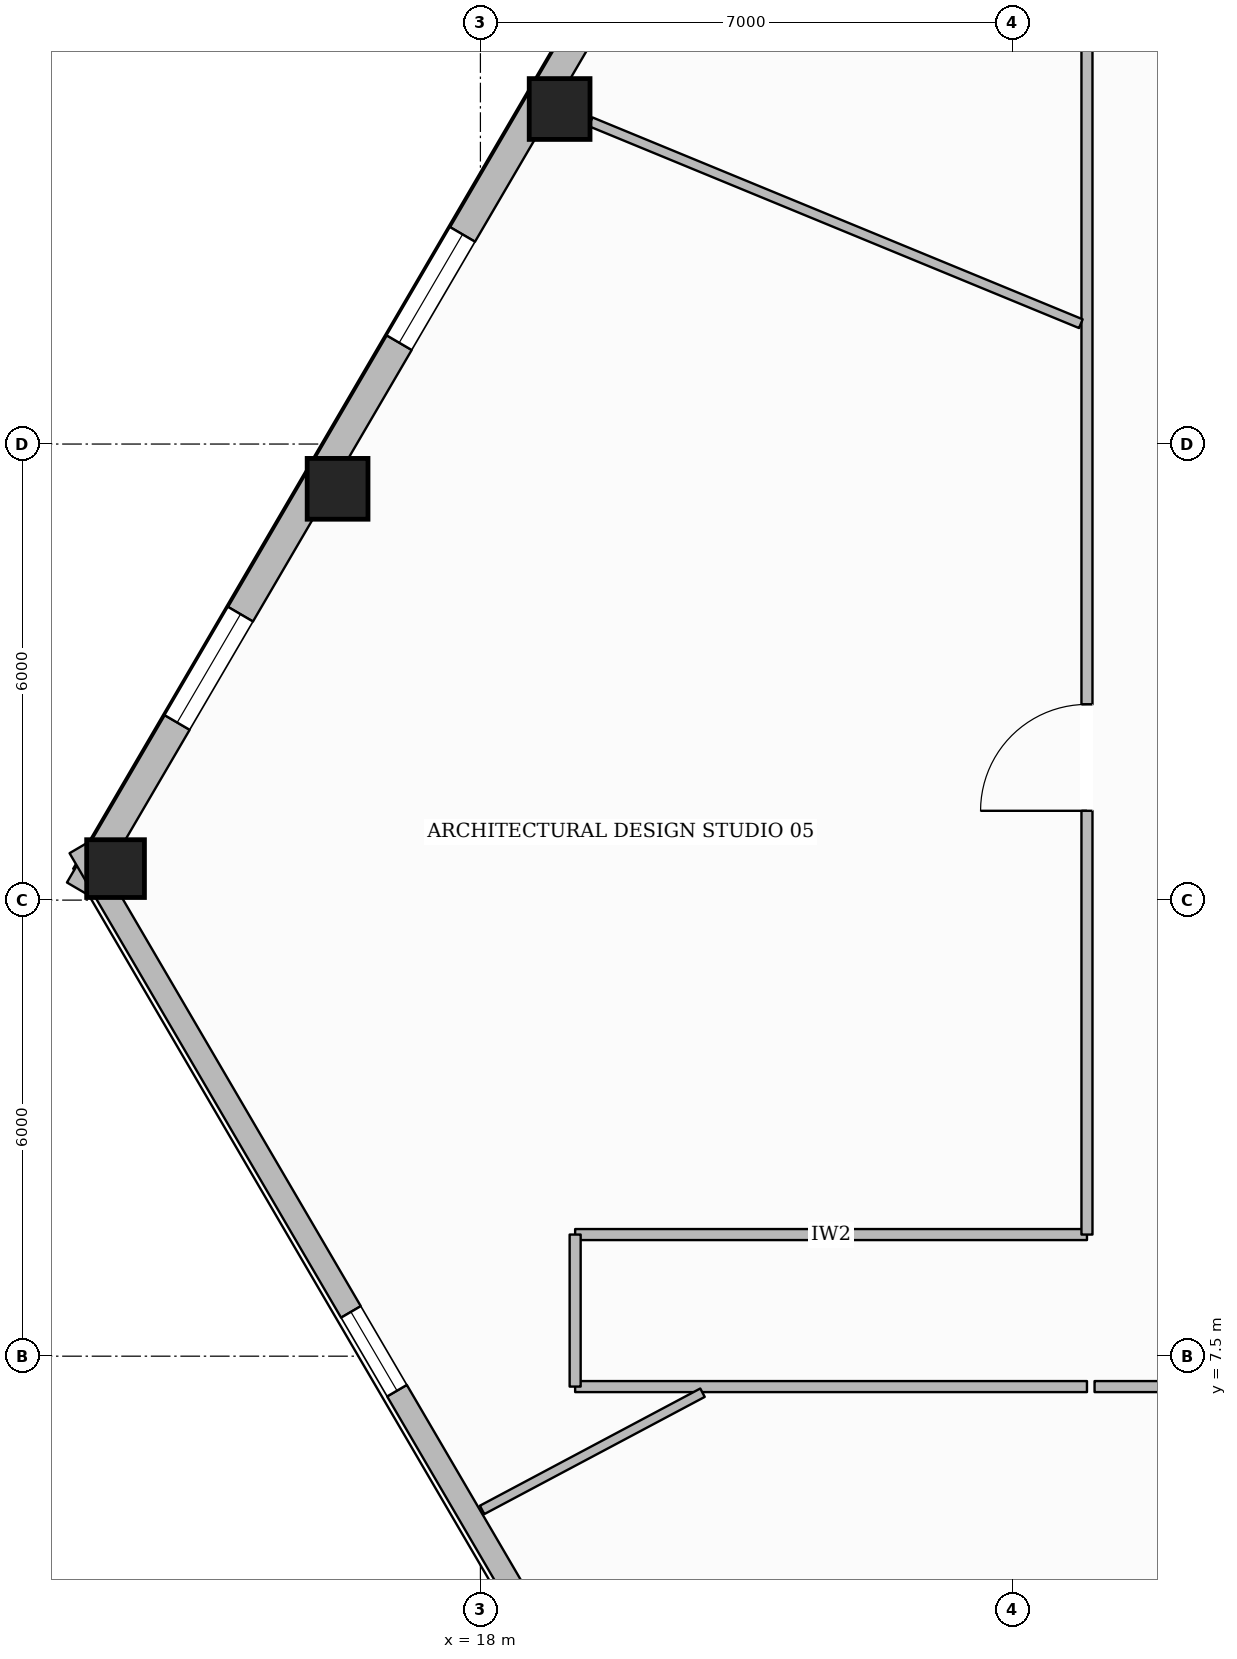
"""IFC4 building model, lengths in metres.
Left out: names, types, materials, properties, quantities, classifications, styles, units other than length and angle.
Written with IfcOpenShell. Run it as: python <this file> out.ifc"""

import sys

from ifc_helpers import new_model, si_unit, direction, frame, frame_2d, origin, origin_2d, place, context, subcontext, project, spatial, rectangle, hollow_rectangle, extrude, element, fill, save


model = new_model("IFC4")
c1 = context("Model", 3, precision=1e-05, world=origin(), true_north=direction((0.0, 1.0)))
c2 = subcontext(c1, "Body", "Model", "MODEL_VIEW")
j1 = project(units=[si_unit("LENGTHUNIT", "METRE"), si_unit("PLANEANGLEUNIT", "RADIAN")], contexts=[c1])
p1 = place(None, origin())
s1 = spatial("IfcSite", under=j1, at=p1, CompositionType="ELEMENT")
p2 = place(p1, origin())
s2 = spatial("IfcBuilding", under=s1, at=p2, CompositionType="ELEMENT")
p3 = place(p2, frame((0.0, 0.0, 59.9)))
s3 = spatial("IfcBuildingStorey", under=s2, at=p3, CompositionType="ELEMENT", Elevation=59.9)
for number, where, z_axis, x_axis in (
    (1, (19.042, 23.908, 0.0), (0.0, 0.0, 1.0), (1.0, 0.0, 0.0)),
    (2, (16.121, 18.911, 0.0), (0.0, 0.0, 1.0), (1.0, 0.0, 0.0)),
):
    element("IfcColumn", number, at=place(p3, frame(where, z_axis=z_axis, x_axis=x_axis)), inside=s3, PredefinedType="COLUMN", context=c2, shape_type="SweptSolid", body=[
        extrude(hollow_rectangle(XDim=0.8, YDim=0.8, WallThickness=0.036, at=origin_2d()), origin(), (0.0, 0.0, 1.0), 3.59),
    ])
p4 = place(p3, frame((13.2, 13.915, 0.0), z_axis=(0.0, 0.0, 1.0), x_axis=(1.0, 0.0, 0.0)))
e3 = element("IfcColumn", 3, at=p4, inside=s3, PredefinedType="COLUMN", context=c2, shape_type="SweptSolid", body=[
    extrude(hollow_rectangle(XDim=0.76, YDim=0.76, WallThickness=0.035, at=origin_2d()), origin(), (0.0, 0.0, 1.0), 3.59),
])
p5 = place(p3, frame((12.724, 13.636, 0.0), z_axis=(0.0, 0.0, 1.0), x_axis=(0.504702471056, 0.863293354376, 0.0)))
e4 = element("IfcWall", 4, at=p5, inside=s3, PredefinedType="STANDARD", context=c2, shape_type="SweptSolid", body=[
    extrude(rectangle(XDim=35.682, YDim=0.38, at=frame_2d((17.841, 0.0))), origin(), (0.0, 0.0, 1.0), 2.97),
])
p6 = place(p5, frame((31.488, 0.0, 0.65)))
e5 = element("IfcOpeningElement", 5, at=p6, cuts=e4, PredefinedType="OPENING", context=c2, shape_type="SweptSolid", body=[
    extrude(rectangle(XDim=1.65, YDim=1.75, at=frame_2d((0.825, 0.875))), frame((0.0, 0.2, 0.0), z_axis=(0.0, -1.0, 0.0), x_axis=(1.0, 0.0, 0.0)), (0.0, 0.0, 1.0), 0.4),
])
p7 = place(p5, frame((25.701, 0.0, 0.65)))
e6 = element("IfcOpeningElement", 6, at=p7, cuts=e4, PredefinedType="OPENING", context=c2, shape_type="SweptSolid", body=[
    extrude(rectangle(XDim=1.65, YDim=1.75, at=frame_2d((0.825, 0.875))), frame((0.0, 0.2, 0.0), z_axis=(0.0, -1.0, 0.0), x_axis=(1.0, 0.0, 0.0)), (0.0, 0.0, 1.0), 0.4),
])
p8 = place(p5, frame((14.125, 0.0, 0.65)))
e7 = element("IfcOpeningElement", 7, at=p8, cuts=e4, PredefinedType="OPENING", context=c2, shape_type="SweptSolid", body=[
    extrude(rectangle(XDim=1.65, YDim=1.75, at=frame_2d((0.825, 0.875))), frame((0.0, 0.2, 0.0), z_axis=(0.0, -1.0, 0.0), x_axis=(1.0, 0.0, 0.0)), (0.0, 0.0, 1.0), 0.4),
])
p9 = place(p5, frame((8.337, 0.0, 0.65)))
e8 = element("IfcOpeningElement", 8, at=p9, cuts=e4, PredefinedType="OPENING", context=c2, shape_type="SweptSolid", body=[
    extrude(rectangle(XDim=1.65, YDim=1.75, at=frame_2d((0.825, 0.875))), frame((0.0, 0.2, 0.0), z_axis=(0.0, -1.0, 0.0), x_axis=(1.0, 0.0, 0.0)), (0.0, 0.0, 1.0), 0.4),
])
p10 = place(p5, frame((2.549, 0.0, 0.65)))
e9 = element("IfcOpeningElement", 9, at=p10, cuts=e4, PredefinedType="OPENING", context=c2, shape_type="SweptSolid", body=[
    extrude(rectangle(XDim=1.65, YDim=1.75, at=frame_2d((0.825, 0.875))), frame((0.0, 0.2, 0.0), z_axis=(0.0, -1.0, 0.0), x_axis=(1.0, 0.0, 0.0)), (0.0, 0.0, 1.0), 0.4),
])
p11 = place(p3, frame((20.475, 0.936, 0.0), z_axis=(0.0, 0.0, 1.0), x_axis=(-0.504699139316, 0.863295302184, 0.0)))
e10 = element("IfcWall", 10, at=p11, inside=s3, PredefinedType="STANDARD", context=c2, shape_type="SweptSolid", body=[
    extrude(rectangle(XDim=15.357, YDim=0.3, at=frame_2d((7.678, 0.0))), origin(), (0.0, 0.0, 1.0), 2.97),
])
p12 = place(p11, frame((7.078, 0.0, 0.65)))
e11 = element("IfcOpeningElement", 11, at=p12, cuts=e10, PredefinedType="OPENING", context=c2, shape_type="SweptSolid", body=[
    extrude(rectangle(XDim=1.2, YDim=1.7, at=frame_2d((0.6, 0.85))), frame((0.0, 0.16, 0.0), z_axis=(0.0, -1.0, 0.0), x_axis=(1.0, 0.0, 0.0)), (0.0, 0.0, 1.0), 0.32),
])
p13 = place(p3, frame((19.246, 9.1, 0.0), z_axis=(0.0, 0.0, 1.0), x_axis=(1.0, 0.0, 0.0)))
e12 = element("IfcWall", 12, at=p13, inside=s3, PredefinedType="PARTITIONING", context=c2, shape_type="SweptSolid", body=[
    extrude(rectangle(XDim=6.734, YDim=0.145, at=frame_2d((3.367, 0.0))), origin(), (0.0, 0.0, 1.0), 3.59),
])
p14 = place(p3, frame((25.98, 9.1, 0.0), z_axis=(0.0, 0.0, 1.0), x_axis=(0.0, 1.0, 0.0)))
e13 = element("IfcWall", 13, at=p14, inside=s3, PredefinedType="PARTITIONING", context=c2, shape_type="SweptSolid", body=[
    extrude(rectangle(XDim=16.0, YDim=0.145, at=frame_2d((8.0, 0.0))), origin(), (0.0, 0.0, 1.0), 3.278),
])
p15 = place(p14, frame((5.575, 0.0, 0.0)))
e14 = element("IfcOpeningElement", 14, at=p15, cuts=e13, PredefinedType="OPENING", context=c2, shape_type="SweptSolid", body=[
    extrude(rectangle(XDim=1.4, YDim=2.2, at=frame_2d((0.7, 1.1))), frame((0.0, 0.083, 0.0), z_axis=(0.0, -1.0, 0.0), x_axis=(1.0, 0.0, 0.0)), (0.0, 0.0, 1.0), 0.165),
])
p16 = place(p3, frame((49.92, 7.1, 0.0), z_axis=(0.0, 0.0, 1.0), x_axis=(-1.0, 0.0, 0.0)))
e15 = element("IfcWall", 15, at=p16, inside=s3, PredefinedType="PARTITIONING", context=c2, shape_type="SweptSolid", body=[
    extrude(rectangle(XDim=23.84, YDim=0.145, at=frame_2d((11.92, 0.0))), origin(), (0.0, 0.0, 1.0), 3.278),
])
p17 = place(p16, frame((18.48, 0.0, 0.0)))
e16 = element("IfcOpeningElement", 16, at=p17, cuts=e15, PredefinedType="OPENING", context=c2, shape_type="SweptSolid", body=[
    extrude(rectangle(XDim=0.88, YDim=2.1, at=frame_2d((0.44, 1.05))), frame((0.0, 0.083, 0.0), z_axis=(0.0, -1.0, 0.0), x_axis=(1.0, 0.0, 0.0)), (0.0, 0.0, 1.0), 0.165),
])
p18 = place(p16, frame((15.96, 0.0, 0.0)))
e17 = element("IfcOpeningElement", 17, at=p18, cuts=e15, PredefinedType="OPENING", context=c2, shape_type="SweptSolid", body=[
    extrude(rectangle(XDim=0.88, YDim=2.1, at=frame_2d((0.44, 1.05))), frame((0.0, 0.083, 0.0), z_axis=(0.0, -1.0, 0.0), x_axis=(1.0, 0.0, 0.0)), (0.0, 0.0, 1.0), 0.165),
])
p19 = place(p16, frame((13.5, 0.0, 0.0)))
e18 = element("IfcOpeningElement", 18, at=p19, cuts=e15, PredefinedType="OPENING", context=c2, shape_type="SweptSolid", body=[
    extrude(rectangle(XDim=0.96, YDim=2.1, at=frame_2d((0.48, 1.05))), frame((0.0, 0.083, 0.0), z_axis=(0.0, -1.0, 0.0), x_axis=(1.0, 0.0, 0.0)), (0.0, 0.0, 1.0), 0.165),
])
p20 = place(p16, frame((5.801, 0.0, 0.0)))
e19 = element("IfcOpeningElement", 19, at=p20, cuts=e15, PredefinedType="OPENING", context=c2, shape_type="SweptSolid", body=[
    extrude(rectangle(XDim=1.4, YDim=2.2, at=frame_2d((0.7, 1.1))), frame((0.0, 0.083, 0.0), z_axis=(0.0, -1.0, 0.0), x_axis=(1.0, 0.0, 0.0)), (0.0, 0.0, 1.0), 0.165),
])
p21 = place(p3, frame((25.98, 7.1, 0.0), z_axis=(0.0, 0.0, 1.0), x_axis=(-1.0, 0.0, 0.0)))
e20 = element("IfcWall", 20, at=p21, inside=s3, PredefinedType="PARTITIONING", context=c2, shape_type="SweptSolid", body=[
    extrude(rectangle(XDim=6.734, YDim=0.145, at=frame_2d((3.367, 0.0))), origin(), (0.0, 0.0, 1.0), 3.59),
])
p22 = place(p3, frame((19.246, 7.1, 0.0), z_axis=(0.0, 0.0, 1.0), x_axis=(0.0, 1.0, 0.0)))
e21 = element("IfcWall", 21, at=p22, inside=s3, PredefinedType="PARTITIONING", context=c2, shape_type="SweptSolid", body=[
    extrude(rectangle(XDim=2.0, YDim=0.145, at=frame_2d((1.0, 0.0))), origin(), (0.0, 0.0, 1.0), 3.59),
])
p23 = place(p3, frame((25.899, 21.083, 0.0), z_axis=(0.0, 0.0, 1.0), x_axis=(-0.924655624126, 0.380804381241, 0.0)))
e22 = element("IfcWall", 22, at=p23, inside=s3, PredefinedType="PARTITIONING", context=c2, shape_type="SweptSolid", body=[
    extrude(rectangle(XDim=6.975, YDim=0.125, at=frame_2d((3.487, 0.0))), origin(), (0.0, 0.0, 1.0), 3.057),
])
p24 = place(p3, frame((20.922, 7.02, 0.0), z_axis=(0.0, 0.0, 1.0), x_axis=(-0.88293664267, -0.469492156517, 0.0)))
e23 = element("IfcWall", 23, at=p24, inside=s3, PredefinedType="PARTITIONING", context=c2, shape_type="SweptSolid", body=[
    extrude(rectangle(XDim=3.284, YDim=0.125, at=frame_2d((1.642, 0.0))), origin(), (0.0, 0.0, 1.0), 3.59),
])
p25 = place(p9, origin())
e24 = element("IfcWindow", 24, at=p25, inside=s3, PartitioningType="SINGLE_PANEL", PredefinedType="WINDOW", context=c2, shape_type="SweptSolid", body=[
    extrude(rectangle(XDim=1.65, YDim=1.75, at=frame_2d((0.825, 0.875))), frame((0.0, 0.03, 0.0), z_axis=(0.0, -1.0, 0.0), x_axis=(1.0, 0.0, 0.0)), (0.0, 0.0, 1.0), 0.06),
])
fill(e8, e24)
p26 = place(p10, origin())
e25 = element("IfcWindow", 25, at=p26, inside=s3, PartitioningType="SINGLE_PANEL", PredefinedType="WINDOW", context=c2, shape_type="SweptSolid", body=[
    extrude(rectangle(XDim=1.65, YDim=1.75, at=frame_2d((0.825, 0.875))), frame((0.0, 0.03, 0.0), z_axis=(0.0, -1.0, 0.0), x_axis=(1.0, 0.0, 0.0)), (0.0, 0.0, 1.0), 0.06),
])
fill(e9, e25)
p27 = place(p12, origin())
e26 = element("IfcWindow", 26, at=p27, inside=s3, PartitioningType="SINGLE_PANEL", PredefinedType="WINDOW", context=c2, shape_type="SweptSolid", body=[
    extrude(rectangle(XDim=1.2, YDim=1.7, at=frame_2d((0.6, 0.85))), frame((0.0, 0.03, 0.0), z_axis=(0.0, -1.0, 0.0), x_axis=(1.0, 0.0, 0.0)), (0.0, 0.0, 1.0), 0.06),
])
fill(e11, e26)
p28 = place(p15, origin())
e27 = element("IfcDoor", 27, at=p28, inside=s3, OperationType="SINGLE_SWING_LEFT", PredefinedType="DOOR", context=c2, shape_type="SweptSolid", body=[
    extrude(rectangle(XDim=1.4, YDim=2.2, at=frame_2d((0.7, 1.1))), frame((0.0, 0.025, 0.0), z_axis=(0.0, -1.0, 0.0), x_axis=(1.0, 0.0, 0.0)), (0.0, 0.0, 1.0), 0.05),
])
fill(e14, e27)
save(model, sys.argv[1])
